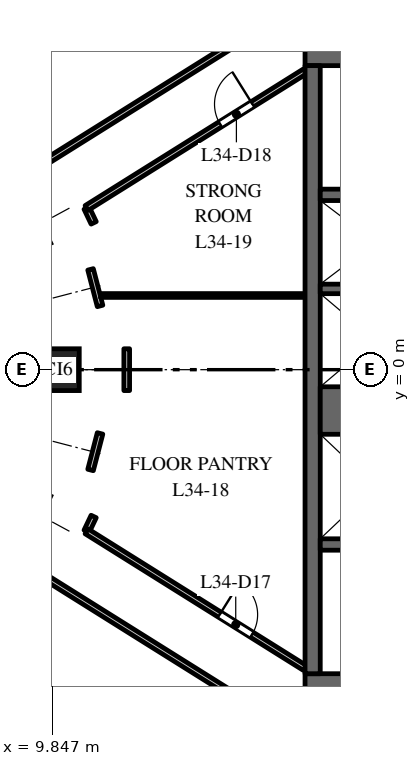
"""IFC4 building model, lengths in metres.
Left out: names, types, materials, properties, quantities, classifications, styles, units other than length and angle.
Written with IfcOpenShell. Run it as: python <this file> out.ifc"""

import sys

from ifc_helpers import new_model, si_unit, direction, frame, frame_2d, origin, origin_2d, place, context, subcontext, project, spatial, rectangle, extrude, element, fill, save


model = new_model("IFC4")
c1 = context("Model", 3, precision=1e-05, world=origin(), true_north=direction((0.0, 1.0)))
c2 = subcontext(c1, "Body", "Model", "MODEL_VIEW")
j1 = project(units=[si_unit("LENGTHUNIT", "METRE"), si_unit("PLANEANGLEUNIT", "RADIAN")], contexts=[c1])
p1 = place(None, origin())
s1 = spatial("IfcSite", under=j1, at=p1, CompositionType="ELEMENT")
p2 = place(p1, origin())
s2 = spatial("IfcBuilding", under=s1, at=p2, CompositionType="ELEMENT")
p3 = place(p2, frame((0.0, 0.0, 150.0)))
s3 = spatial("IfcBuildingStorey", under=s2, at=p3, CompositionType="ELEMENT", Elevation=150.0)
p4 = place(p3, frame((10.008, 0.0, 0.0), z_axis=(0.0, 0.0, 1.0), x_axis=(0.0, 1.0, 0.0)))
e1 = element("IfcColumn", 1, at=p4, inside=s3, PredefinedType="COLUMN", context=c2, shape_type="SweptSolid", body=[
    extrude(rectangle(XDim=1.1, YDim=1.1, at=origin_2d()), origin(), (0.0, 0.0, 1.0), 4.0),
])
p5 = place(p3, frame((16.5, 8.25, 0.0), z_axis=(0.0, 0.0, 1.0), x_axis=(1.0, 0.0, 0.0)))
e2 = element("IfcWall", 2, at=p5, inside=s3, PredefinedType="SHEAR", context=c2, shape_type="SweptSolid", body=[
    extrude(rectangle(XDim=15.0, YDim=0.5, at=frame_2d((7.5, 0.0))), origin(), (0.0, 0.0, 1.0), 3.7),
])
p6 = place(p5, frame((6.9, 0.0, 0.0)))
e3 = element("IfcOpeningElement", 3, at=p6, cuts=e2, PredefinedType="OPENING", context=c2, shape_type="SweptSolid", body=[
    extrude(rectangle(XDim=1.2, YDim=2.1, at=frame_2d((0.6, 1.05))), frame((0.0, 0.26, 0.0), z_axis=(0.0, -1.0, 0.0), x_axis=(1.0, 0.0, 0.0)), (0.0, 0.0, 1.0), 0.52),
])
p7 = place(p5, frame((12.275, 0.0, 0.0)))
e4 = element("IfcOpeningElement", 4, at=p7, cuts=e2, PredefinedType="OPENING", context=c2, shape_type="SweptSolid", body=[
    extrude(rectangle(XDim=0.9, YDim=2.1, at=frame_2d((0.45, 1.05))), frame((0.0, 0.26, 0.0), z_axis=(0.0, -1.0, 0.0), x_axis=(1.0, 0.0, 0.0)), (0.0, 0.0, 1.0), 0.52),
])
p8 = place(p3, frame((16.5, -8.25, 0.0), z_axis=(0.0, 0.0, 1.0), x_axis=(1.0, 0.0, 0.0)))
e5 = element("IfcWall", 5, at=p8, inside=s3, PredefinedType="SHEAR", context=c2, shape_type="SweptSolid", body=[
    extrude(rectangle(XDim=15.0, YDim=0.5, at=frame_2d((7.5, 0.0))), origin(), (0.0, 0.0, 1.0), 3.7),
])
p9 = place(p8, frame((6.9, 0.0, 0.0)))
e6 = element("IfcOpeningElement", 6, at=p9, cuts=e5, PredefinedType="OPENING", context=c2, shape_type="SweptSolid", body=[
    extrude(rectangle(XDim=1.2, YDim=2.1, at=frame_2d((0.6, 1.05))), frame((0.0, 0.26, 0.0), z_axis=(0.0, -1.0, 0.0), x_axis=(1.0, 0.0, 0.0)), (0.0, 0.0, 1.0), 0.52),
])
p10 = place(p8, frame((12.95, 0.0, 0.0)))
e7 = element("IfcOpeningElement", 7, at=p10, cuts=e5, PredefinedType="OPENING", context=c2, shape_type="SweptSolid", body=[
    extrude(rectangle(XDim=0.9, YDim=2.1, at=frame_2d((0.45, 1.05))), frame((0.0, 0.26, 0.0), z_axis=(0.0, -1.0, 0.0), x_axis=(1.0, 0.0, 0.0)), (0.0, 0.0, 1.0), 0.52),
])
p11 = place(p3, frame((16.7, -8.0, 0.0), z_axis=(0.0, 0.0, 1.0), x_axis=(0.0, 1.0, 0.0)))
e8 = element("IfcWall", 8, at=p11, inside=s3, PredefinedType="SHEAR", context=c2, shape_type="SweptSolid", body=[
    extrude(rectangle(XDim=16.0, YDim=0.4, at=frame_2d((8.0, 0.0))), origin(), (0.0, 0.0, 1.0), 3.7),
])
p12 = place(p3, frame((16.9, -1.075, 0.0), z_axis=(0.0, 0.0, 1.0), x_axis=(1.0, 0.0, 0.0)))
e9 = element("IfcWall", 9, at=p12, inside=s3, PredefinedType="SHEAR", context=c2, shape_type="SweptSolid", body=[
    extrude(rectangle(XDim=2.9, YDim=1.25, at=frame_2d((1.45, 0.0))), origin(), (0.0, 0.0, 1.0), 3.7),
])
p13 = place(p3, frame((16.9, 2.125, 0.0), z_axis=(0.0, 0.0, 1.0), x_axis=(1.0, 0.0, 0.0)))
e10 = element("IfcWall", 10, at=p13, inside=s3, PredefinedType="SHEAR", context=c2, shape_type="SweptSolid", body=[
    extrude(rectangle(XDim=2.9, YDim=0.25, at=frame_2d((1.45, 0.0))), origin(), (0.0, 0.0, 1.0), 3.7),
])
p14 = place(p3, frame((16.9, 4.6, 0.0), z_axis=(0.0, 0.0, 1.0), x_axis=(1.0, 0.0, 0.0)))
e11 = element("IfcWall", 11, at=p14, inside=s3, PredefinedType="SHEAR", context=c2, shape_type="SweptSolid", body=[
    extrude(rectangle(XDim=6.18, YDim=0.3, at=frame_2d((3.09, 0.0))), origin(), (0.0, 0.0, 1.0), 3.7),
])
p15 = place(p14, frame((4.9, 0.0, 0.0)))
e12 = element("IfcOpeningElement", 12, at=p15, cuts=e11, PredefinedType="OPENING", context=c2, shape_type="SweptSolid", body=[
    extrude(rectangle(XDim=1.1, YDim=2.1, at=frame_2d((0.55, 1.05))), frame((0.0, 0.16, 0.0), z_axis=(0.0, -1.0, 0.0), x_axis=(1.0, 0.0, 0.0)), (0.0, 0.0, 1.0), 0.32),
])
p16 = place(p3, frame((16.9, -4.6, 0.0), z_axis=(0.0, 0.0, 1.0), x_axis=(1.0, 0.0, 0.0)))
e13 = element("IfcWall", 13, at=p16, inside=s3, PredefinedType="SHEAR", context=c2, shape_type="SweptSolid", body=[
    extrude(rectangle(XDim=6.18, YDim=0.3, at=frame_2d((3.09, 0.0))), origin(), (0.0, 0.0, 1.0), 3.7),
])
p17 = place(p16, frame((4.9, 0.0, 0.0)))
e14 = element("IfcOpeningElement", 14, at=p17, cuts=e13, PredefinedType="OPENING", context=c2, shape_type="SweptSolid", body=[
    extrude(rectangle(XDim=1.1, YDim=2.1, at=frame_2d((0.55, 1.05))), frame((0.0, 0.16, 0.0), z_axis=(0.0, -1.0, 0.0), x_axis=(1.0, 0.0, 0.0)), (0.0, 0.0, 1.0), 0.32),
])
p18 = place(p3, frame((8.477, -7.111, 0.0), z_axis=(0.0, 0.0, 1.0), x_axis=(0.338406456341, -0.941000037357, 0.0)))
e15 = element("IfcWall", 15, at=p18, inside=s3, PredefinedType="PARTITIONING", context=c2, shape_type="SweptSolid", body=[
    extrude(rectangle(XDim=19.418, YDim=0.1, at=frame_2d((9.709, 0.0))), origin(), (0.0, 0.0, 1.0), 2.85),
])
p19 = place(p3, frame((8.478, 7.111, 0.0), z_axis=(0.0, 0.0, 1.0), x_axis=(0.338361922043, 0.941016051782, 0.0)))
e16 = element("IfcWall", 16, at=p19, inside=s3, PredefinedType="PARTITIONING", context=c2, shape_type="SweptSolid", body=[
    extrude(rectangle(XDim=19.417, YDim=0.1, at=frame_2d((9.708, 0.0))), origin(), (0.0, 0.0, 1.0), 2.85),
])
for number, where, z_axis, x_axis in (
    (17, (9.736, -5.505, 0.0), (0.0, 0.0, 1.0), (0.848, -0.531, 0.0)),
    (18, (9.736, 5.505, 0.0), (0.0, 0.0, 1.0), (0.848, 0.531, 0.0)),
):
    element("IfcWall", number, at=place(p3, frame(where, z_axis=z_axis, x_axis=x_axis)), inside=s3, PredefinedType="PARTITIONING", context=c2, shape_type="SweptSolid", body=[
        extrude(rectangle(XDim=6.315, YDim=0.15, at=frame_2d((3.158, 0.0))), origin(), (0.0, 0.0, 1.0), 3.7),
    ])
p20 = place(p3, frame((10.752, -4.254, 0.0), z_axis=(0.0, 0.0, 1.0), x_axis=(0.429758433873, 0.90294390109, 0.0)))
e19 = element("IfcWall", 19, at=p20, inside=s3, PredefinedType="PARTITIONING", context=c2, shape_type="SweptSolid", body=[
    extrude(rectangle(XDim=0.433, YDim=0.15, at=frame_2d((0.216, 0.0))), origin(), (0.0, 0.0, 1.0), 3.7),
])
p21 = place(p3, frame((10.752, -4.254, 0.0), z_axis=(0.0, 0.0, 1.0), x_axis=(0.847690706888, -0.530490777917, 0.0)))
e20 = element("IfcWall", 20, at=p21, inside=s3, PredefinedType="PARTITIONING", context=c2, shape_type="SweptSolid", body=[
    extrude(rectangle(XDim=6.781, YDim=0.15, at=frame_2d((3.39, 0.0))), origin(), (0.0, 0.0, 1.0), 3.7),
])
p22 = place(p21, frame((4.129, 0.0, 0.0)))
e21 = element("IfcOpeningElement", 21, at=p22, cuts=e20, PredefinedType="OPENING", context=c2, shape_type="SweptSolid", body=[
    extrude(rectangle(XDim=1.0, YDim=2.1, at=frame_2d((0.5, 1.05))), frame((0.0, 0.085, 0.0), z_axis=(0.0, -1.0, 0.0), x_axis=(1.0, 0.0, 0.0)), (0.0, 0.0, 1.0), 0.17),
])
p23 = place(p3, frame((10.752, 4.254, 0.0), z_axis=(0.0, 0.0, 1.0), x_axis=(0.429758433873, -0.90294390109, 0.0)))
e22 = element("IfcWall", 22, at=p23, inside=s3, PredefinedType="PARTITIONING", context=c2, shape_type="SweptSolid", body=[
    extrude(rectangle(XDim=0.433, YDim=0.15, at=frame_2d((0.216, 0.0))), origin(), (0.0, 0.0, 1.0), 3.7),
])
p24 = place(p3, frame((10.752, 4.254, 0.0), z_axis=(0.0, 0.0, 1.0), x_axis=(0.847690706888, 0.530490777917, 0.0)))
e23 = element("IfcWall", 23, at=p24, inside=s3, PredefinedType="PARTITIONING", context=c2, shape_type="SweptSolid", body=[
    extrude(rectangle(XDim=6.781, YDim=0.15, at=frame_2d((3.39, 0.0))), origin(), (0.0, 0.0, 1.0), 3.7),
])
p25 = place(p24, frame((4.15, 0.0, 0.0)))
e24 = element("IfcOpeningElement", 24, at=p25, cuts=e23, PredefinedType="OPENING", context=c2, shape_type="SweptSolid", body=[
    extrude(rectangle(XDim=1.0, YDim=2.1, at=frame_2d((0.5, 1.05))), frame((0.0, 0.085, 0.0), z_axis=(0.0, -1.0, 0.0), x_axis=(1.0, 0.0, 0.0)), (0.0, 0.0, 1.0), 0.17),
])
for number, where, z_axis, x_axis in (
    (25, (10.856, -2.639, 0.0), (0.0, 0.0, 1.0), (0.252, 0.968, 0.0)),
    (26, (10.856, 2.639, 0.0), (0.0, 0.0, 1.0), (0.252, -0.968, 0.0)),
):
    element("IfcWall", number, at=place(p3, frame(where, z_axis=z_axis, x_axis=x_axis)), inside=s3, PredefinedType="PARTITIONING", context=c2, shape_type="SweptSolid", body=[
        extrude(rectangle(XDim=0.994, YDim=0.15, at=frame_2d((0.497, 0.0))), origin(), (0.0, 0.0, 1.0), 3.7),
    ])
p26 = place(p3, frame((11.116, 1.952, 0.0), z_axis=(0.0, 0.0, 1.0), x_axis=(1.0, 0.0, 0.0)))
e27 = element("IfcWall", 27, at=p26, inside=s3, PredefinedType="PARTITIONING", context=c2, shape_type="SweptSolid", body=[
    extrude(rectangle(XDim=5.384, YDim=0.1, at=frame_2d((2.692, 0.0))), origin(), (0.0, 0.0, 1.0), 3.7),
])
p27 = place(p3, frame((11.808, -0.55, 0.0), z_axis=(0.0, 0.0, 1.0), x_axis=(0.0, 1.0, 0.0)))
e28 = element("IfcWall", 28, at=p27, inside=s3, PredefinedType="PARTITIONING", context=c2, shape_type="SweptSolid", body=[
    extrude(rectangle(XDim=1.1, YDim=0.15, at=frame_2d((0.55, 0.0))), origin(), (0.0, 0.0, 1.0), 3.7),
])
p28 = place(p22, origin())
e29 = element("IfcDoor", 29, at=p28, inside=s3, OperationType="SINGLE_SWING_LEFT", PredefinedType="DOOR", context=c2, shape_type="SweptSolid", body=[
    extrude(rectangle(XDim=1.0, YDim=2.1, at=frame_2d((0.5, 1.05))), frame((0.0, 0.025, 0.0), z_axis=(0.0, -1.0, 0.0), x_axis=(1.0, 0.0, 0.0)), (0.0, 0.0, 1.0), 0.05),
])
fill(e21, e29)
p29 = place(p25, origin())
e30 = element("IfcDoor", 30, at=p29, inside=s3, OperationType="SINGLE_SWING_RIGHT", PredefinedType="DOOR", context=c2, shape_type="SweptSolid", body=[
    extrude(rectangle(XDim=1.0, YDim=2.1, at=frame_2d((0.5, 1.05))), frame((0.0, 0.025, 0.0), z_axis=(0.0, -1.0, 0.0), x_axis=(1.0, 0.0, 0.0)), (0.0, 0.0, 1.0), 0.05),
])
fill(e24, e30)
save(model, sys.argv[1])
